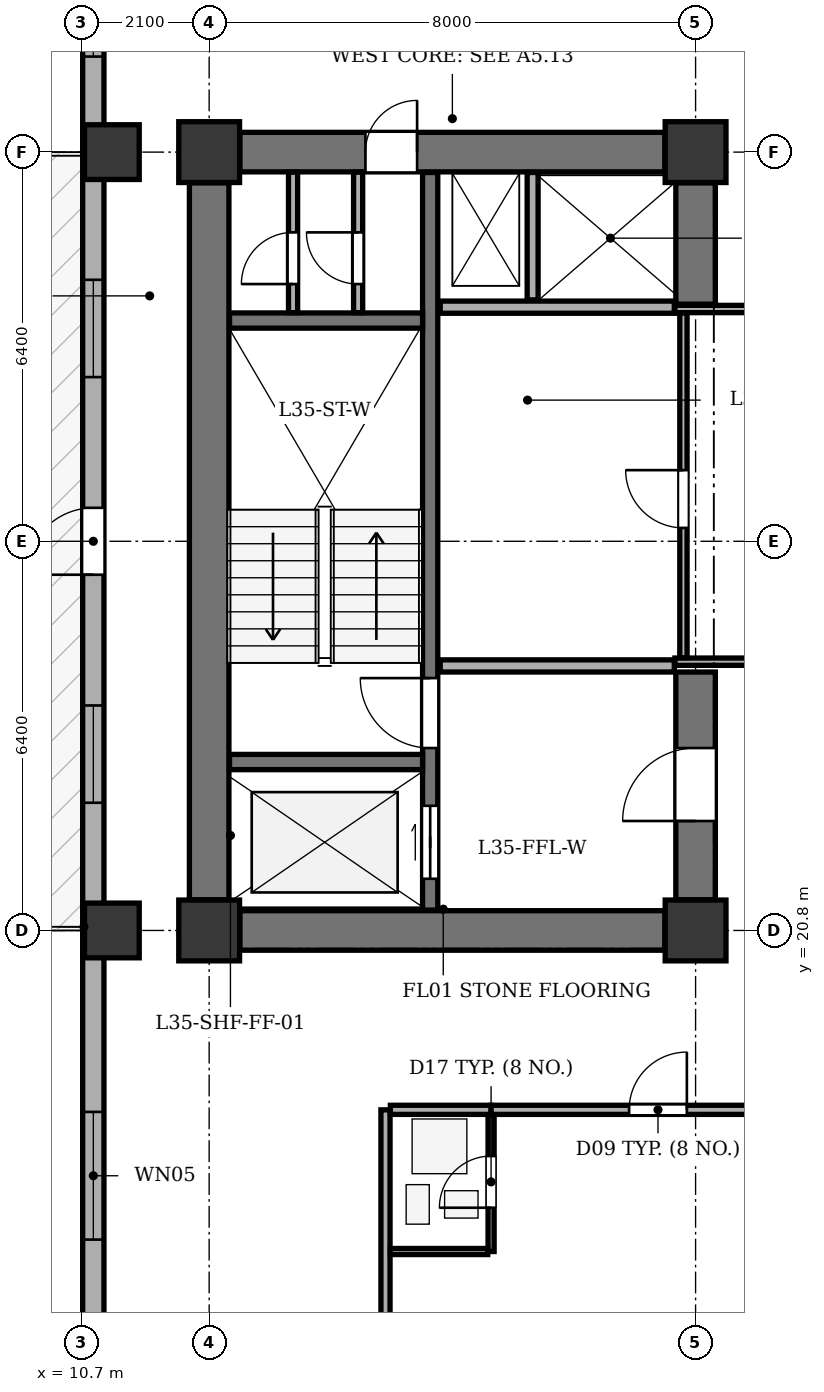
"""IFC4 building model, lengths in metres.
Left out: names, types, materials, properties, quantities, classifications, styles, units other than length and angle.
Written with IfcOpenShell. Run it as: python <this file> out.ifc"""

import sys

from ifc_helpers import new_model, si_unit, direction, frame, frame_2d, origin, origin_2d, place, context, subcontext, project, spatial, rectangle, extrude, element, fill, save


model = new_model("IFC4")
c1 = context("Model", 3, precision=1e-05, world=origin(), true_north=direction((0.0, 1.0)))
c2 = subcontext(c1, "Body", "Model", "MODEL_VIEW")
j1 = project(units=[si_unit("LENGTHUNIT", "METRE"), si_unit("PLANEANGLEUNIT", "RADIAN")], contexts=[c1])
p1 = place(None, origin())
s1 = spatial("IfcSite", under=j1, at=p1, CompositionType="ELEMENT")
p2 = place(p1, origin())
s2 = spatial("IfcBuilding", under=s1, at=p2, CompositionType="ELEMENT")
p3 = place(p2, frame((0.0, 0.0, 141.3)))
s3 = spatial("IfcBuildingStorey", under=s2, at=p3, CompositionType="ELEMENT", Elevation=141.3)
for number, where, z_axis, x_axis in (
    (1, (12.8, 20.8, 0.0), (0.0, 0.0, 1.0), (1.0, 0.0, 0.0)),
    (2, (20.8, 20.8, 0.0), (0.0, 0.0, 1.0), (1.0, 0.0, 0.0)),
    (3, (12.8, 33.6, 0.0), (0.0, 0.0, 1.0), (1.0, 0.0, 0.0)),
    (4, (20.8, 33.6, 0.0), (0.0, 0.0, 1.0), (1.0, 0.0, 0.0)),
):
    element("IfcColumn", number, at=place(p3, frame(where, z_axis=z_axis, x_axis=x_axis)), inside=s3, PredefinedType="COLUMN", context=c2, shape_type="SweptSolid", body=[
        extrude(rectangle(XDim=1.0, YDim=1.0, at=origin_2d()), origin(), (0.0, 0.0, 1.0), 3.5),
    ])
for number, where, z_axis, x_axis in (
    (5, (11.2, 20.8, 0.0), (0.0, 0.0, 1.0), (1.0, 0.0, 0.0)),
    (6, (11.2, 33.6, 0.0), (0.0, 0.0, 1.0), (1.0, 0.0, 0.0)),
):
    element("IfcColumn", number, at=place(p3, frame(where, z_axis=z_axis, x_axis=x_axis)), inside=s3, PredefinedType="COLUMN", context=c2, shape_type="SweptSolid", body=[
        extrude(rectangle(XDim=0.9, YDim=0.9, at=origin_2d()), origin(), (0.0, 0.0, 1.0), 3.5),
    ])
p4 = place(p3, frame((10.895, 6.5, 0.0), z_axis=(0.0, 0.0, 1.0), x_axis=(0.0, 1.0, 0.0)))
e7 = element("IfcWall", 7, at=p4, inside=s3, PredefinedType="STANDARD", context=c2, shape_type="SweptSolid", body=[
    extrude(rectangle(XDim=35.0, YDim=0.35, at=frame_2d((17.5, 0.0))), origin(), (0.0, 0.0, 1.0), 2.785),
])
p5 = place(p4, frame((20.15, 0.0, 0.0)))
e8 = element("IfcOpeningElement", 8, at=p5, cuts=e7, PredefinedType="OPENING", context=c2, shape_type="SweptSolid", body=[
    extrude(rectangle(XDim=1.1, YDim=2.05, at=frame_2d((0.55, 1.025))), frame((0.0, 0.185, 0.0), z_axis=(0.0, -1.0, 0.0), x_axis=(1.0, 0.0, 0.0)), (0.0, 0.0, 1.0), 0.37),
])
p6 = place(p4, frame((3.31, 0.0, 0.75)))
e9 = element("IfcOpeningElement", 9, at=p6, cuts=e7, PredefinedType="OPENING", context=c2, shape_type="SweptSolid", body=[
    extrude(rectangle(XDim=1.6, YDim=1.75, at=frame_2d((0.8, 0.875))), frame((0.0, 0.185, 0.0), z_axis=(0.0, -1.0, 0.0), x_axis=(1.0, 0.0, 0.0)), (0.0, 0.0, 1.0), 0.37),
])
p7 = place(p4, frame((9.216, 0.0, 0.75)))
e10 = element("IfcOpeningElement", 10, at=p7, cuts=e7, PredefinedType="OPENING", context=c2, shape_type="SweptSolid", body=[
    extrude(rectangle(XDim=2.1, YDim=1.75, at=frame_2d((1.05, 0.875))), frame((0.0, 0.185, 0.0), z_axis=(0.0, -1.0, 0.0), x_axis=(1.0, 0.0, 0.0)), (0.0, 0.0, 1.0), 0.37),
])
p8 = place(p4, frame((16.4, 0.0, 0.75)))
e11 = element("IfcOpeningElement", 11, at=p8, cuts=e7, PredefinedType="OPENING", context=c2, shape_type="SweptSolid", body=[
    extrude(rectangle(XDim=1.6, YDim=1.75, at=frame_2d((0.8, 0.875))), frame((0.0, 0.185, 0.0), z_axis=(0.0, -1.0, 0.0), x_axis=(1.0, 0.0, 0.0)), (0.0, 0.0, 1.0), 0.37),
])
p9 = place(p4, frame((23.4, 0.0, 0.75)))
e12 = element("IfcOpeningElement", 12, at=p9, cuts=e7, PredefinedType="OPENING", context=c2, shape_type="SweptSolid", body=[
    extrude(rectangle(XDim=1.6, YDim=1.75, at=frame_2d((0.8, 0.875))), frame((0.0, 0.185, 0.0), z_axis=(0.0, -1.0, 0.0), x_axis=(1.0, 0.0, 0.0)), (0.0, 0.0, 1.0), 0.37),
])
p10 = place(p4, frame((28.671, 0.0, 0.75)))
e13 = element("IfcOpeningElement", 13, at=p10, cuts=e7, PredefinedType="OPENING", context=c2, shape_type="SweptSolid", body=[
    extrude(rectangle(XDim=1.6, YDim=1.75, at=frame_2d((0.8, 0.875))), frame((0.0, 0.185, 0.0), z_axis=(0.0, -1.0, 0.0), x_axis=(1.0, 0.0, 0.0)), (0.0, 0.0, 1.0), 0.37),
])
p11 = place(p4, frame((31.755, 0.0, 0.75)))
e14 = element("IfcOpeningElement", 14, at=p11, cuts=e7, PredefinedType="OPENING", context=c2, shape_type="SweptSolid", body=[
    extrude(rectangle(XDim=1.6, YDim=1.75, at=frame_2d((0.8, 0.875))), frame((0.0, 0.185, 0.0), z_axis=(0.0, -1.0, 0.0), x_axis=(1.0, 0.0, 0.0)), (0.0, 0.0, 1.0), 0.37),
])
p12 = place(p3, frame((12.8, 21.305, 0.0), z_axis=(0.0, 0.0, 1.0), x_axis=(0.0, 1.0, 0.0)))
e15 = element("IfcWall", 15, at=p12, inside=s3, PredefinedType="SHEAR", context=c2, shape_type="SweptSolid", body=[
    extrude(rectangle(XDim=11.79, YDim=0.65, at=frame_2d((5.895, 0.0))), origin(), (0.0, 0.0, 1.0), 3.2),
])
p13 = place(p3, frame((13.305, 20.8, 0.0), z_axis=(0.0, 0.0, 1.0), x_axis=(1.0, 0.0, 0.0)))
e16 = element("IfcWall", 16, at=p13, inside=s3, PredefinedType="SHEAR", context=c2, shape_type="SweptSolid", body=[
    extrude(rectangle(XDim=6.99, YDim=0.65, at=frame_2d((3.495, 0.0))), origin(), (0.0, 0.0, 1.0), 3.2),
])
p14 = place(p3, frame((13.305, 33.6, 0.0), z_axis=(0.0, 0.0, 1.0), x_axis=(1.0, 0.0, 0.0)))
e17 = element("IfcWall", 17, at=p14, inside=s3, PredefinedType="SHEAR", context=c2, shape_type="SweptSolid", body=[
    extrude(rectangle(XDim=6.99, YDim=0.65, at=frame_2d((3.495, 0.0))), origin(), (0.0, 0.0, 1.0), 3.2),
])
p15 = place(p14, frame((2.065, 0.0, 0.0)))
e18 = element("IfcOpeningElement", 18, at=p15, cuts=e17, PredefinedType="OPENING", context=c2, shape_type="SweptSolid", body=[
    extrude(rectangle(XDim=0.85, YDim=2.02, at=frame_2d((0.425, 1.01))), frame((0.0, 0.335, 0.0), z_axis=(0.0, -1.0, 0.0), x_axis=(1.0, 0.0, 0.0)), (0.0, 0.0, 1.0), 0.67),
])
p16 = place(p3, frame((20.8, 21.305, 0.0), z_axis=(0.0, 0.0, 1.0), x_axis=(0.0, 1.0, 0.0)))
e19 = element("IfcWall", 19, at=p16, inside=s3, PredefinedType="SHEAR", context=c2, shape_type="SweptSolid", body=[
    extrude(rectangle(XDim=3.745, YDim=0.65, at=frame_2d((1.873, 0.0))), origin(), (0.0, 0.0, 1.0), 3.2),
])
p17 = place(p16, frame((1.295, 0.0, 0.0)))
e20 = element("IfcOpeningElement", 20, at=p17, cuts=e19, PredefinedType="OPENING", context=c2, shape_type="SweptSolid", body=[
    extrude(rectangle(XDim=1.2, YDim=2.15, at=frame_2d((0.6, 1.075))), frame((0.0, 0.335, 0.0), z_axis=(0.0, -1.0, 0.0), x_axis=(1.0, 0.0, 0.0)), (0.0, 0.0, 1.0), 0.67),
])
p18 = place(p3, frame((20.8, 31.1, 0.0), z_axis=(0.0, 0.0, 1.0), x_axis=(0.0, 1.0, 0.0)))
e21 = element("IfcWall", 21, at=p18, inside=s3, PredefinedType="SHEAR", context=c2, shape_type="SweptSolid", body=[
    extrude(rectangle(XDim=1.995, YDim=0.65, at=frame_2d((0.998, 0.0))), origin(), (0.0, 0.0, 1.0), 3.2),
])
p19 = place(p3, frame((16.435, 21.135, 0.0), z_axis=(0.0, 0.0, 1.0), x_axis=(0.0, 1.0, 0.0)))
e22 = element("IfcWall", 22, at=p19, inside=s3, PredefinedType="SHEAR", context=c2, shape_type="SweptSolid", body=[
    extrude(rectangle(XDim=12.13, YDim=0.25, at=frame_2d((6.065, 0.0))), origin(), (0.0, 0.0, 1.0), 3.2),
])
p20 = place(p19, frame((0.515, 0.0, 0.0)))
e23 = element("IfcOpeningElement", 23, at=p20, cuts=e22, PredefinedType="OPENING", context=c2, shape_type="SweptSolid", body=[
    extrude(rectangle(XDim=1.2, YDim=2.15, at=frame_2d((0.6, 1.075))), frame((0.0, 0.135, 0.0), z_axis=(0.0, -1.0, 0.0), x_axis=(1.0, 0.0, 0.0)), (0.0, 0.0, 1.0), 0.27),
])
p21 = place(p19, frame((2.665, 0.0, 0.0)))
e24 = element("IfcOpeningElement", 24, at=p21, cuts=e22, PredefinedType="OPENING", context=c2, shape_type="SweptSolid", body=[
    extrude(rectangle(XDim=1.15, YDim=2.15, at=frame_2d((0.575, 1.075))), frame((0.0, 0.135, 0.0), z_axis=(0.0, -1.0, 0.0), x_axis=(1.0, 0.0, 0.0)), (0.0, 0.0, 1.0), 0.27),
])
for number, where, z_axis, x_axis in (
    (25, (13.135, 23.57, 0.0), (0.0, 0.0, 1.0), (1.0, 0.0, 0.0)),
    (26, (13.135, 30.83, 0.0), (0.0, 0.0, 1.0), (1.0, 0.0, 0.0)),
):
    element("IfcWall", number, at=place(p3, frame(where, z_axis=z_axis, x_axis=x_axis)), inside=s3, PredefinedType="SHEAR", context=c2, shape_type="SweptSolid", body=[
        extrude(rectangle(XDim=3.175, YDim=0.25, at=frame_2d((1.587, 0.0))), origin(), (0.0, 0.0, 1.0), 3.2),
    ])
for number, where, z_axis, x_axis in (
    (27, (16.6, 25.15, 0.0), (0.0, 0.0, 1.0), (1.0, 0.0, 0.0)),
    (28, (16.6, 31.05, 0.0), (0.0, 0.0, 1.0), (1.0, 0.0, 0.0)),
):
    element("IfcWall", number, at=place(p3, frame(where, z_axis=z_axis, x_axis=x_axis)), inside=s3, PredefinedType="SOLIDWALL", context=c2, shape_type="SweptSolid", body=[
        extrude(rectangle(XDim=3.85, YDim=0.2, at=frame_2d((1.925, 0.0))), origin(), (0.0, 0.0, 1.0), 3.2),
    ])
p22 = place(p3, frame((18.12, 31.17, 0.0), z_axis=(0.0, 0.0, 1.0), x_axis=(0.0, 1.0, 0.0)))
e29 = element("IfcWall", 29, at=p22, inside=s3, PredefinedType="PARTITIONING", context=c2, shape_type="SweptSolid", body=[
    extrude(rectangle(XDim=2.095, YDim=0.18, at=frame_2d((1.047, 0.0))), origin(), (0.0, 0.0, 1.0), 3.2),
])
p23 = place(p3, frame((14.18, 30.96, 0.0), z_axis=(0.0, 0.0, 1.0), x_axis=(0.0, 1.0, 0.0)))
e30 = element("IfcWall", 30, at=p23, inside=s3, PredefinedType="PARTITIONING", context=c2, shape_type="SweptSolid", body=[
    extrude(rectangle(XDim=2.31, YDim=0.15, at=frame_2d((1.155, 0.0))), origin(), (0.0, 0.0, 1.0), 3.2),
])
p24 = place(p23, frame((0.47, 0.0, 0.0)))
e31 = element("IfcOpeningElement", 31, at=p24, cuts=e30, PredefinedType="OPENING", context=c2, shape_type="SweptSolid", body=[
    extrude(rectangle(XDim=0.85, YDim=2.02, at=frame_2d((0.425, 1.01))), frame((0.0, 0.085, 0.0), z_axis=(0.0, -1.0, 0.0), x_axis=(1.0, 0.0, 0.0)), (0.0, 0.0, 1.0), 0.17),
])
p25 = place(p3, frame((15.25, 30.96, 0.0), z_axis=(0.0, 0.0, 1.0), x_axis=(0.0, 1.0, 0.0)))
e32 = element("IfcWall", 32, at=p25, inside=s3, PredefinedType="PARTITIONING", context=c2, shape_type="SweptSolid", body=[
    extrude(rectangle(XDim=2.31, YDim=0.15, at=frame_2d((1.155, 0.0))), origin(), (0.0, 0.0, 1.0), 3.2),
])
p26 = place(p25, frame((0.47, 0.0, 0.0)))
e33 = element("IfcOpeningElement", 33, at=p26, cuts=e32, PredefinedType="OPENING", context=c2, shape_type="SweptSolid", body=[
    extrude(rectangle(XDim=0.85, YDim=2.02, at=frame_2d((0.425, 1.01))), frame((0.0, 0.085, 0.0), z_axis=(0.0, -1.0, 0.0), x_axis=(1.0, 0.0, 0.0)), (0.0, 0.0, 1.0), 0.17),
])
p27 = place(p3, frame((20.46, 25.22, 0.0), z_axis=(0.0, 0.0, 1.0), x_axis=(1.0, 0.0, 0.0)))
e34 = element("IfcWall", 34, at=p27, inside=s3, PredefinedType="PARTITIONING", context=c2, shape_type="SweptSolid", body=[
    extrude(rectangle(XDim=11.94, YDim=0.12, at=frame_2d((5.97, 0.0))), origin(), (0.0, 0.0, 1.0), 3.2),
])
p28 = place(p27, frame((2.39, 0.0, 0.0)))
e35 = element("IfcOpeningElement", 35, at=p28, cuts=e34, PredefinedType="OPENING", context=c2, shape_type="SweptSolid", body=[
    extrude(rectangle(XDim=1.0, YDim=2.1, at=frame_2d((0.5, 1.05))), frame((0.0, 0.07, 0.0), z_axis=(0.0, -1.0, 0.0), x_axis=(1.0, 0.0, 0.0)), (0.0, 0.0, 1.0), 0.14),
])
p29 = place(p3, frame((20.46, 31.02, 0.0), z_axis=(0.0, 0.0, 1.0), x_axis=(1.0, 0.0, 0.0)))
e36 = element("IfcWall", 36, at=p29, inside=s3, PredefinedType="PARTITIONING", context=c2, shape_type="SweptSolid", body=[
    extrude(rectangle(XDim=11.94, YDim=0.12, at=frame_2d((5.97, 0.0))), origin(), (0.0, 0.0, 1.0), 3.2),
])
p30 = place(p3, frame((20.6, 25.285, 0.0), z_axis=(0.0, 0.0, 1.0), x_axis=(0.0, 1.0, 0.0)))
e37 = element("IfcWall", 37, at=p30, inside=s3, PredefinedType="PARTITIONING", context=c2, shape_type="SweptSolid", body=[
    extrude(rectangle(XDim=5.67, YDim=0.12, at=frame_2d((2.835, 0.0))), origin(), (0.0, 0.0, 1.0), 2.735),
])
p31 = place(p30, frame((2.135, 0.0, 0.0)))
e38 = element("IfcOpeningElement", 38, at=p31, cuts=e37, PredefinedType="OPENING", context=c2, shape_type="SweptSolid", body=[
    extrude(rectangle(XDim=0.95, YDim=2.1, at=frame_2d((0.475, 1.05))), frame((0.0, 0.07, 0.0), z_axis=(0.0, -1.0, 0.0), x_axis=(1.0, 0.0, 0.0)), (0.0, 0.0, 1.0), 0.14),
])
p32 = place(p3, frame((15.7, 1.875, 0.0), z_axis=(0.0, 0.0, 1.0), x_axis=(0.0, 1.0, 0.0)))
e39 = element("IfcWall", 39, at=p32, inside=s3, PredefinedType="PARTITIONING", context=c2, shape_type="SweptSolid", body=[
    extrude(rectangle(XDim=15.975, YDim=0.15, at=frame_2d((7.988, 0.0))), origin(), (0.0, 0.0, 1.0), 3.2),
])
p33 = place(p3, frame((15.78, 17.85, 0.0), z_axis=(0.0, 0.0, 1.0), x_axis=(1.0, 0.0, 0.0)))
e40 = element("IfcWall", 40, at=p33, inside=s3, PredefinedType="PARTITIONING", context=c2, shape_type="SweptSolid", body=[
    extrude(rectangle(XDim=1.656, YDim=0.15, at=frame_2d((0.828, 0.0))), origin(), (0.0, 0.0, 1.0), 3.2),
])
p34 = place(p3, frame((17.437, 17.85, 0.0), z_axis=(0.0, 0.0, 1.0), x_axis=(1.0, 0.0, 0.0)))
e41 = element("IfcWall", 41, at=p34, inside=s3, PredefinedType="PARTITIONING", context=c2, shape_type="SweptSolid", body=[
    extrude(rectangle(XDim=5.419, YDim=0.15, at=frame_2d((2.71, 0.0))), origin(), (0.0, 0.0, 1.0), 3.2),
])
p35 = place(p34, frame((2.27, 0.0, 0.0)))
e42 = element("IfcOpeningElement", 42, at=p35, cuts=e41, PredefinedType="OPENING", context=c2, shape_type="SweptSolid", body=[
    extrude(rectangle(XDim=0.95, YDim=2.1, at=frame_2d((0.475, 1.05))), frame((0.0, 0.085, 0.0), z_axis=(0.0, -1.0, 0.0), x_axis=(1.0, 0.0, 0.0)), (0.0, 0.0, 1.0), 0.17),
])
p36 = place(p3, frame((17.437, 15.52, 0.0), z_axis=(0.0, 0.0, 1.0), x_axis=(0.0, 1.0, 0.0)))
e43 = element("IfcWall", 43, at=p36, inside=s3, PredefinedType="PARTITIONING", context=c2, shape_type="SweptSolid", body=[
    extrude(rectangle(XDim=2.25, YDim=0.1, at=frame_2d((1.125, 0.0))), origin(), (0.0, 0.0, 1.0), 3.2),
])
p37 = place(p36, frame((0.72, 0.0, 0.0)))
e44 = element("IfcOpeningElement", 44, at=p37, cuts=e43, PredefinedType="OPENING", context=c2, shape_type="SweptSolid", body=[
    extrude(rectangle(XDim=0.85, YDim=2.05, at=frame_2d((0.425, 1.025))), frame((0.0, 0.06, 0.0), z_axis=(0.0, -1.0, 0.0), x_axis=(1.0, 0.0, 0.0)), (0.0, 0.0, 1.0), 0.12),
])
p38 = place(p3, frame((15.78, 15.52, 0.0), z_axis=(0.0, 0.0, 1.0), x_axis=(1.0, 0.0, 0.0)))
e45 = element("IfcWall", 45, at=p38, inside=s3, PredefinedType="PARTITIONING", context=c2, shape_type="SweptSolid", body=[
    extrude(rectangle(XDim=1.602, YDim=0.1, at=frame_2d((0.801, 0.0))), origin(), (0.0, 0.0, 1.0), 3.2),
])
p39 = place(p5, origin())
e46 = element("IfcDoor", 46, at=p39, inside=s3, OperationType="SINGLE_SWING_LEFT", PredefinedType="DOOR", context=c2, shape_type="SweptSolid", body=[
    extrude(rectangle(XDim=1.1, YDim=2.05, at=frame_2d((0.55, 1.025))), frame((0.0, 0.025, 0.0), z_axis=(0.0, -1.0, 0.0), x_axis=(1.0, 0.0, 0.0)), (0.0, 0.0, 1.0), 0.05),
])
fill(e8, e46)
p40 = place(p7, origin())
e47 = element("IfcWindow", 47, at=p40, inside=s3, PartitioningType="SINGLE_PANEL", PredefinedType="WINDOW", context=c2, shape_type="SweptSolid", body=[
    extrude(rectangle(XDim=2.1, YDim=1.75, at=frame_2d((1.05, 0.875))), frame((0.0, -0.01, 0.0), z_axis=(0.0, -1.0, 0.0), x_axis=(1.0, 0.0, 0.0)), (0.0, 0.0, 1.0), 0.06),
])
fill(e10, e47)
p41 = place(p8, origin())
e48 = element("IfcWindow", 48, at=p41, inside=s3, PartitioningType="SINGLE_PANEL", PredefinedType="WINDOW", context=c2, shape_type="SweptSolid", body=[
    extrude(rectangle(XDim=1.6, YDim=1.75, at=frame_2d((0.8, 0.875))), frame((0.0, -0.01, 0.0), z_axis=(0.0, -1.0, 0.0), x_axis=(1.0, 0.0, 0.0)), (0.0, 0.0, 1.0), 0.06),
])
fill(e11, e48)
p42 = place(p9, origin())
e49 = element("IfcWindow", 49, at=p42, inside=s3, PartitioningType="SINGLE_PANEL", PredefinedType="WINDOW", context=c2, shape_type="SweptSolid", body=[
    extrude(rectangle(XDim=1.6, YDim=1.75, at=frame_2d((0.8, 0.875))), frame((0.0, -0.01, 0.0), z_axis=(0.0, -1.0, 0.0), x_axis=(1.0, 0.0, 0.0)), (0.0, 0.0, 1.0), 0.06),
])
fill(e12, e49)
p43 = place(p10, origin())
e50 = element("IfcWindow", 50, at=p43, inside=s3, PartitioningType="SINGLE_PANEL", PredefinedType="WINDOW", context=c2, shape_type="SweptSolid", body=[
    extrude(rectangle(XDim=1.6, YDim=1.75, at=frame_2d((0.8, 0.875))), frame((0.0, -0.01, 0.0), z_axis=(0.0, -1.0, 0.0), x_axis=(1.0, 0.0, 0.0)), (0.0, 0.0, 1.0), 0.06),
])
fill(e13, e50)
p44 = place(p15, origin())
e51 = element("IfcDoor", 51, at=p44, inside=s3, OperationType="SINGLE_SWING_RIGHT", PredefinedType="DOOR", context=c2, shape_type="SweptSolid", body=[
    extrude(rectangle(XDim=0.85, YDim=2.02, at=frame_2d((0.425, 1.01))), frame((0.0, 0.025, 0.0), z_axis=(0.0, -1.0, 0.0), x_axis=(1.0, 0.0, 0.0)), (0.0, 0.0, 1.0), 0.05),
])
fill(e18, e51)
p45 = place(p17, origin())
e52 = element("IfcDoor", 52, at=p45, inside=s3, OperationType="SINGLE_SWING_LEFT", PredefinedType="DOOR", context=c2, shape_type="SweptSolid", body=[
    extrude(rectangle(XDim=1.2, YDim=2.15, at=frame_2d((0.6, 1.075))), frame((0.0, 0.025, 0.0), z_axis=(0.0, -1.0, 0.0), x_axis=(1.0, 0.0, 0.0)), (0.0, 0.0, 1.0), 0.05),
])
fill(e20, e52)
p46 = place(p20, origin())
e53 = element("IfcDoor", 53, at=p46, inside=s3, OperationType="DOUBLE_DOOR_SLIDING", PredefinedType="DOOR", context=c2, shape_type="SweptSolid", body=[
    extrude(rectangle(XDim=1.2, YDim=2.15, at=frame_2d((0.6, 1.075))), frame((0.0, 0.025, 0.0), z_axis=(0.0, -1.0, 0.0), x_axis=(1.0, 0.0, 0.0)), (0.0, 0.0, 1.0), 0.05),
])
fill(e23, e53)
p47 = place(p21, origin())
e54 = element("IfcDoor", 54, at=p47, inside=s3, OperationType="SINGLE_SWING_RIGHT", PredefinedType="DOOR", context=c2, shape_type="SweptSolid", body=[
    extrude(rectangle(XDim=1.15, YDim=2.15, at=frame_2d((0.575, 1.075))), frame((0.0, 0.025, 0.0), z_axis=(0.0, -1.0, 0.0), x_axis=(1.0, 0.0, 0.0)), (0.0, 0.0, 1.0), 0.05),
])
fill(e24, e54)
p48 = place(p24, origin())
e55 = element("IfcDoor", 55, at=p48, inside=s3, OperationType="SINGLE_SWING_LEFT", PredefinedType="DOOR", context=c2, shape_type="SweptSolid", body=[
    extrude(rectangle(XDim=0.85, YDim=2.02, at=frame_2d((0.425, 1.01))), frame((0.0, 0.025, 0.0), z_axis=(0.0, -1.0, 0.0), x_axis=(1.0, 0.0, 0.0)), (0.0, 0.0, 1.0), 0.05),
])
fill(e31, e55)
p49 = place(p26, origin())
e56 = element("IfcDoor", 56, at=p49, inside=s3, OperationType="SINGLE_SWING_RIGHT", PredefinedType="DOOR", context=c2, shape_type="SweptSolid", body=[
    extrude(rectangle(XDim=0.85, YDim=2.02, at=frame_2d((0.425, 1.01))), frame((0.0, 0.025, 0.0), z_axis=(0.0, -1.0, 0.0), x_axis=(1.0, 0.0, 0.0)), (0.0, 0.0, 1.0), 0.05),
])
fill(e33, e56)
p50 = place(p31, origin())
e57 = element("IfcDoor", 57, at=p50, inside=s3, OperationType="SINGLE_SWING_RIGHT", PredefinedType="DOOR", context=c2, shape_type="SweptSolid", body=[
    extrude(rectangle(XDim=0.95, YDim=2.1, at=frame_2d((0.475, 1.05))), frame((0.0, 0.025, 0.0), z_axis=(0.0, -1.0, 0.0), x_axis=(1.0, 0.0, 0.0)), (0.0, 0.0, 1.0), 0.05),
])
fill(e38, e57)
p51 = place(p37, origin())
e58 = element("IfcDoor", 58, at=p51, inside=s3, OperationType="SINGLE_SWING_LEFT", PredefinedType="DOOR", context=c2, shape_type="SweptSolid", body=[
    extrude(rectangle(XDim=0.85, YDim=2.05, at=frame_2d((0.425, 1.025))), frame((0.0, 0.025, 0.0), z_axis=(0.0, -1.0, 0.0), x_axis=(1.0, 0.0, 0.0)), (0.0, 0.0, 1.0), 0.05),
])
fill(e44, e58)
p52 = place(p35, origin())
e59 = element("IfcDoor", 59, at=p52, inside=s3, OperationType="SINGLE_SWING_RIGHT", PredefinedType="DOOR", context=c2, shape_type="SweptSolid", body=[
    extrude(rectangle(XDim=0.95, YDim=2.1, at=frame_2d((0.475, 1.05))), frame((0.0, 0.025, 0.0), z_axis=(0.0, -1.0, 0.0), x_axis=(1.0, 0.0, 0.0)), (0.0, 0.0, 1.0), 0.05),
])
fill(e42, e59)
save(model, sys.argv[1])
